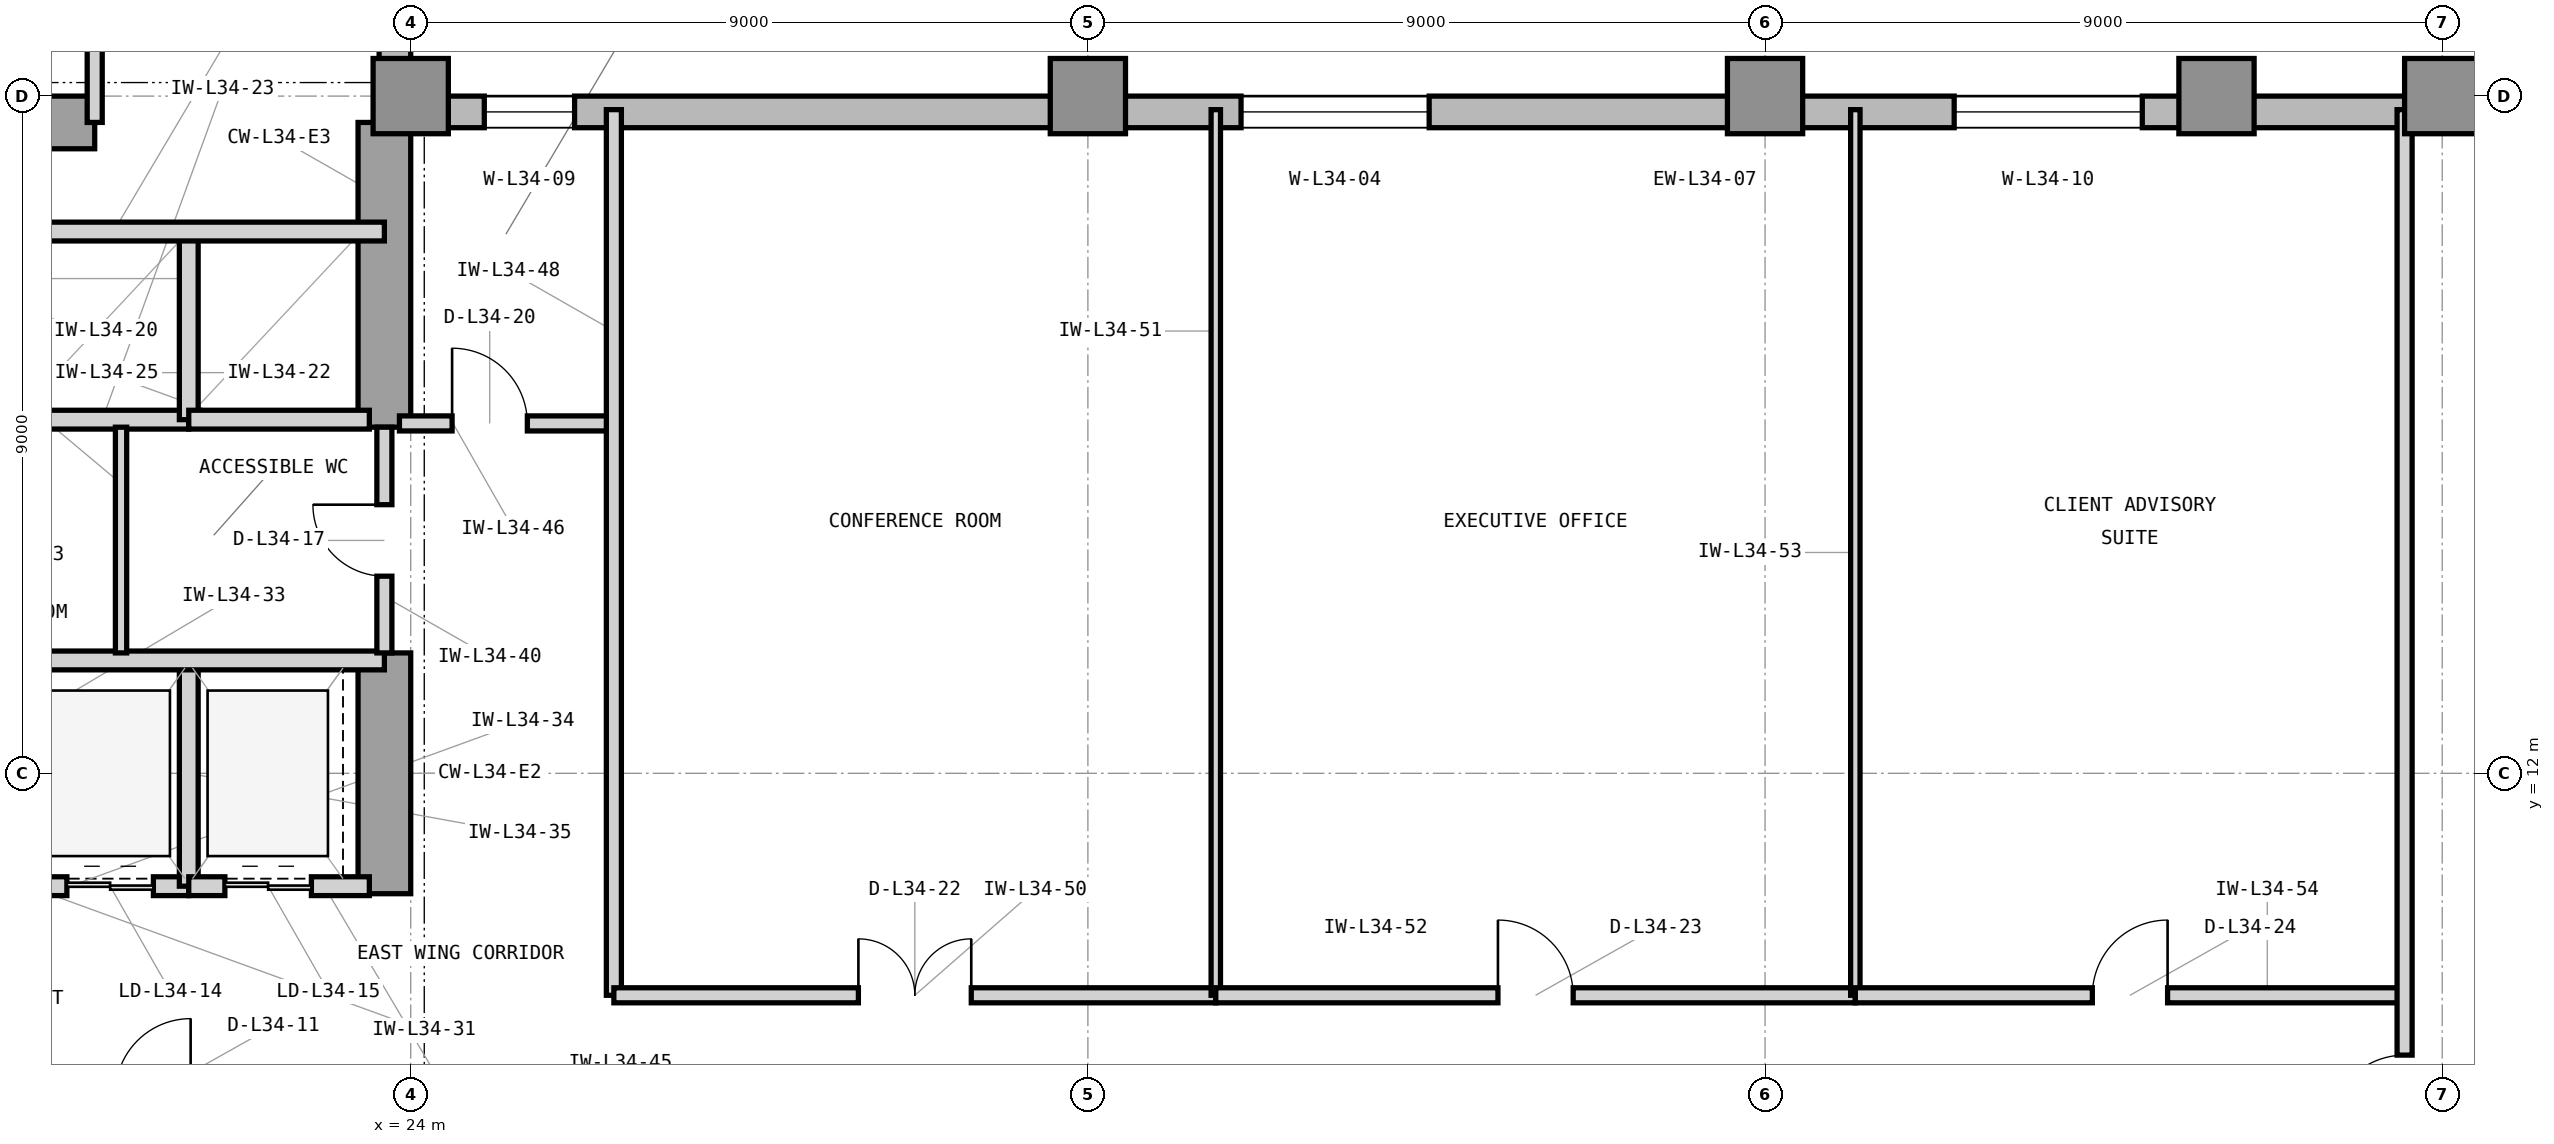
"""IFC4 building model, lengths in metres.
Left out: names, types, materials, properties, quantities, classifications, styles, units other than length and angle.
Written with IfcOpenShell. Run it as: python <this file> out.ifc"""

import sys

from ifc_helpers import new_model, si_unit, direction, frame, frame_2d, origin, origin_2d, place, context, subcontext, project, spatial, rectangle, extrude, element, fill, save


model = new_model("IFC4")
c1 = context("Model", 3, precision=1e-05, world=origin(), true_north=direction((0.0, 1.0)))
c2 = subcontext(c1, "Body", "Model", "MODEL_VIEW")
j1 = project(units=[si_unit("LENGTHUNIT", "METRE"), si_unit("PLANEANGLEUNIT", "RADIAN")], contexts=[c1])
p1 = place(None, origin())
s1 = spatial("IfcSite", under=j1, at=p1, CompositionType="ELEMENT")
p2 = place(p1, origin())
s2 = spatial("IfcBuilding", under=s1, at=p2, CompositionType="ELEMENT")
p3 = place(p2, frame((0.0, 0.0, 144.0)))
s3 = spatial("IfcBuildingStorey", under=s2, at=p3, CompositionType="ELEMENT", Elevation=144.0)
p4 = place(p3, frame((7.475, 20.65, 0.0), z_axis=(0.0, 0.0, 1.0), x_axis=(1.0, 0.0, 0.0)))
e1 = element("IfcWall", 1, at=p4, inside=s3, PredefinedType="SHEAR", context=c2, shape_type="SweptSolid", body=[
    extrude(rectangle(XDim=12.325, YDim=0.7, at=frame_2d((6.163, 0.0))), origin(), (0.0, 0.0, 1.0), 3.9),
])
p5 = place(p3, frame((23.65, 10.4, 0.0), z_axis=(0.0, 0.0, 1.0), x_axis=(0.0, 1.0, 0.0)))
e2 = element("IfcWall", 2, at=p5, inside=s3, PredefinedType="SHEAR", context=c2, shape_type="SweptSolid", body=[
    extrude(rectangle(XDim=3.2, YDim=0.7, at=frame_2d((1.6, 0.0))), origin(), (0.0, 0.0, 1.0), 3.9),
])
p6 = place(p3, frame((23.65, 16.6, 0.0), z_axis=(0.0, 0.0, 1.0), x_axis=(0.0, 1.0, 0.0)))
e3 = element("IfcWall", 3, at=p6, inside=s3, PredefinedType="SHEAR", context=c2, shape_type="SweptSolid", body=[
    extrude(rectangle(XDim=4.05, YDim=0.7, at=frame_2d((2.025, 0.0))), origin(), (0.0, 0.0, 1.0), 3.9),
])
for number, where, z_axis, x_axis in (
    (4, (24.0, 21.0, 0.0), (0.0, 0.0, 1.0), (1.0, 0.0, 0.0)),
    (5, (33.0, 21.0, 0.0), (0.0, 0.0, 1.0), (1.0, 0.0, 0.0)),
    (6, (42.0, 21.0, 0.0), (0.0, 0.0, 1.0), (1.0, 0.0, 0.0)),
    (7, (48.0, 21.0, 0.0), (0.0, 0.0, 1.0), (1.0, 0.0, 0.0)),
    (8, (51.0, 21.0, 0.0), (0.0, 0.0, 1.0), (1.0, 0.0, 0.0)),
):
    element("IfcColumn", number, at=place(p3, frame(where, z_axis=z_axis, x_axis=x_axis)), inside=s3, PredefinedType="COLUMN", context=c2, shape_type="SweptSolid", body=[
        extrude(rectangle(XDim=1.0, YDim=1.0, at=origin_2d()), origin(), (0.0, 0.0, 1.0), 3.9),
    ])
p7 = place(p3, frame((58.4, 20.79, 0.0), z_axis=(0.0, 0.0, 1.0), x_axis=(-1.0, 0.0, 0.0)))
e9 = element("IfcWall", 9, at=p7, inside=s3, PredefinedType="STANDARD", context=c2, shape_type="SweptSolid", body=[
    extrude(rectangle(XDim=34.4, YDim=0.42, at=frame_2d((17.2, 0.0))), origin(), (0.0, 0.0, 1.0), 3.7),
])
p8 = place(p7, frame((20.864, 0.0, 0.85)))
e10 = element("IfcOpeningElement", 10, at=p8, cuts=e9, PredefinedType="OPENING", context=c2, shape_type="SweptSolid", body=[
    extrude(rectangle(XDim=2.5, YDim=2.25, at=frame_2d((1.25, 1.125))), frame((0.0, 0.22, 0.0), z_axis=(0.0, -1.0, 0.0), x_axis=(1.0, 0.0, 0.0)), (0.0, 0.0, 1.0), 0.44),
])
p9 = place(p7, frame((32.222, 0.0, 0.85)))
e11 = element("IfcOpeningElement", 11, at=p9, cuts=e9, PredefinedType="OPENING", context=c2, shape_type="SweptSolid", body=[
    extrude(rectangle(XDim=1.2, YDim=2.25, at=frame_2d((0.6, 1.125))), frame((0.0, 0.22, 0.0), z_axis=(0.0, -1.0, 0.0), x_axis=(1.0, 0.0, 0.0)), (0.0, 0.0, 1.0), 0.44),
])
p10 = place(p7, frame((11.386, 0.0, 0.85)))
e12 = element("IfcOpeningElement", 12, at=p10, cuts=e9, PredefinedType="OPENING", context=c2, shape_type="SweptSolid", body=[
    extrude(rectangle(XDim=2.5, YDim=2.25, at=frame_2d((1.25, 1.125))), frame((0.0, 0.22, 0.0), z_axis=(0.0, -1.0, 0.0), x_axis=(1.0, 0.0, 0.0)), (0.0, 0.0, 1.0), 0.44),
])
p11 = place(p3, frame((23.79, 21.0, 0.0), z_axis=(0.0, 0.0, 1.0), x_axis=(0.0, 1.0, 0.0)))
e13 = element("IfcWall", 13, at=p11, inside=s3, PredefinedType="STANDARD", context=c2, shape_type="SweptSolid", body=[
    extrude(rectangle(XDim=25.4, YDim=0.42, at=frame_2d((12.7, 0.0))), origin(), (0.0, 0.0, 1.0), 3.7),
])
p12 = place(p11, frame((11.45, 0.0, 0.85)))
e14 = element("IfcOpeningElement", 14, at=p12, cuts=e13, PredefinedType="OPENING", context=c2, shape_type="SweptSolid", body=[
    extrude(rectangle(XDim=2.5, YDim=2.25, at=frame_2d((1.25, 1.125))), frame((0.0, 0.22, 0.0), z_axis=(0.0, -1.0, 0.0), x_axis=(1.0, 0.0, 0.0)), (0.0, 0.0, 1.0), 0.44),
])
p13 = place(p11, frame((15.966, 0.0, 0.85)))
e15 = element("IfcOpeningElement", 15, at=p13, cuts=e13, PredefinedType="OPENING", context=c2, shape_type="SweptSolid", body=[
    extrude(rectangle(XDim=1.2, YDim=2.25, at=frame_2d((0.6, 1.125))), frame((0.0, 0.22, 0.0), z_axis=(0.0, -1.0, 0.0), x_axis=(1.0, 0.0, 0.0)), (0.0, 0.0, 1.0), 0.44),
])
p14 = place(p3, frame((18.75, 16.7, 0.0), z_axis=(0.0, 0.0, 1.0), x_axis=(1.0, 0.0, 0.0)))
e16 = element("IfcWall", 16, at=p14, inside=s3, PredefinedType="PARTITIONING", context=c2, shape_type="SweptSolid", body=[
    extrude(rectangle(XDim=2.3, YDim=0.25, at=frame_2d((1.15, 0.0))), origin(), (0.0, 0.0, 1.0), 3.233),
])
p15 = place(p3, frame((21.05, 16.7, 0.0), z_axis=(0.0, 0.0, 1.0), x_axis=(0.0, 1.0, 0.0)))
e17 = element("IfcWall", 17, at=p15, inside=s3, PredefinedType="PARTITIONING", context=c2, shape_type="SweptSolid", body=[
    extrude(rectangle(XDim=2.5, YDim=0.25, at=frame_2d((1.25, 0.0))), origin(), (0.0, 0.0, 1.0), 3.69),
])
p16 = place(p3, frame((21.05, 16.7, 0.0), z_axis=(0.0, 0.0, 1.0), x_axis=(1.0, 0.0, 0.0)))
e18 = element("IfcWall", 18, at=p16, inside=s3, PredefinedType="PARTITIONING", context=c2, shape_type="SweptSolid", body=[
    extrude(rectangle(XDim=2.4, YDim=0.25, at=frame_2d((1.2, 0.0))), origin(), (0.0, 0.0, 1.0), 3.233),
])
p17 = place(p3, frame((16.45, 19.2, 0.0), z_axis=(0.0, 0.0, 1.0), x_axis=(1.0, 0.0, 0.0)))
e19 = element("IfcWall", 19, at=p17, inside=s3, PredefinedType="PARTITIONING", context=c2, shape_type="SweptSolid", body=[
    extrude(rectangle(XDim=7.2, YDim=0.25, at=frame_2d((3.6, 0.0))), origin(), (0.0, 0.0, 1.0), 3.69),
])
p18 = place(p3, frame((18.95, 10.5, 0.0), z_axis=(0.0, 0.0, 1.0), x_axis=(1.0, 0.0, 0.0)))
e20 = element("IfcWall", 20, at=p18, inside=s3, PredefinedType="PARTITIONING", context=c2, shape_type="SweptSolid", body=[
    extrude(rectangle(XDim=2.1, YDim=0.25, at=frame_2d((1.05, 0.0))), origin(), (0.0, 0.0, 1.0), 3.233),
])
p19 = place(p18, frame((0.48, 0.0, 0.0)))
e21 = element("IfcOpeningElement", 21, at=p19, cuts=e20, PredefinedType="OPENING", context=c2, shape_type="SweptSolid", body=[
    extrude(rectangle(XDim=1.15, YDim=2.25, at=frame_2d((0.575, 1.125))), frame((0.0, 0.135, 0.0), z_axis=(0.0, -1.0, 0.0), x_axis=(1.0, 0.0, 0.0)), (0.0, 0.0, 1.0), 0.27),
])
p20 = place(p3, frame((21.05, 10.5, 0.0), z_axis=(0.0, 0.0, 1.0), x_axis=(0.0, 1.0, 0.0)))
e22 = element("IfcWall", 22, at=p20, inside=s3, PredefinedType="PARTITIONING", context=c2, shape_type="SweptSolid", body=[
    extrude(rectangle(XDim=3.0, YDim=0.25, at=frame_2d((1.5, 0.0))), origin(), (0.0, 0.0, 1.0), 3.69),
])
p21 = place(p3, frame((21.05, 10.5, 0.0), z_axis=(0.0, 0.0, 1.0), x_axis=(1.0, 0.0, 0.0)))
e23 = element("IfcWall", 23, at=p21, inside=s3, PredefinedType="PARTITIONING", context=c2, shape_type="SweptSolid", body=[
    extrude(rectangle(XDim=2.4, YDim=0.25, at=frame_2d((1.2, 0.0))), origin(), (0.0, 0.0, 1.0), 3.233),
])
p22 = place(p21, frame((0.48, 0.0, 0.0)))
e24 = element("IfcOpeningElement", 24, at=p22, cuts=e23, PredefinedType="OPENING", context=c2, shape_type="SweptSolid", body=[
    extrude(rectangle(XDim=1.15, YDim=2.25, at=frame_2d((0.575, 1.125))), frame((0.0, 0.135, 0.0), z_axis=(0.0, -1.0, 0.0), x_axis=(1.0, 0.0, 0.0)), (0.0, 0.0, 1.0), 0.27),
])
p23 = place(p3, frame((14.7, 13.5, 0.0), z_axis=(0.0, 0.0, 1.0), x_axis=(1.0, 0.0, 0.0)))
e25 = element("IfcWall", 25, at=p23, inside=s3, PredefinedType="PARTITIONING", context=c2, shape_type="SweptSolid", body=[
    extrude(rectangle(XDim=8.95, YDim=0.25, at=frame_2d((4.475, 0.0))), origin(), (0.0, 0.0, 1.0), 3.233),
])
p24 = place(p3, frame((20.15, 13.6, 0.0), z_axis=(0.0, 0.0, 1.0), x_axis=(0.0, 1.0, 0.0)))
e26 = element("IfcWall", 26, at=p24, inside=s3, PredefinedType="PARTITIONING", context=c2, shape_type="SweptSolid", body=[
    extrude(rectangle(XDim=3.0, YDim=0.15, at=frame_2d((1.5, 0.0))), origin(), (0.0, 0.0, 1.0), 3.69),
])
p25 = place(p3, frame((23.65, 13.6, 0.0), z_axis=(0.0, 0.0, 1.0), x_axis=(0.0, 1.0, 0.0)))
e27 = element("IfcWall", 27, at=p25, inside=s3, PredefinedType="PARTITIONING", context=c2, shape_type="SweptSolid", body=[
    extrude(rectangle(XDim=3.0, YDim=0.2, at=frame_2d((1.5, 0.0))), origin(), (0.0, 0.0, 1.0), 3.69),
])
p26 = place(p25, frame((1.02, 0.0, 0.0)))
e28 = element("IfcOpeningElement", 28, at=p26, cuts=e27, PredefinedType="OPENING", context=c2, shape_type="SweptSolid", body=[
    extrude(rectangle(XDim=0.95, YDim=2.1, at=frame_2d((0.475, 1.05))), frame((0.0, 0.11, 0.0), z_axis=(0.0, -1.0, 0.0), x_axis=(1.0, 0.0, 0.0)), (0.0, 0.0, 1.0), 0.22),
])
p27 = place(p3, frame((23.85, 16.65, 0.0), z_axis=(0.0, 0.0, 1.0), x_axis=(1.0, 0.0, 0.0)))
e29 = element("IfcWall", 29, at=p27, inside=s3, PredefinedType="PARTITIONING", context=c2, shape_type="SweptSolid", body=[
    extrude(rectangle(XDim=2.85, YDim=0.2, at=frame_2d((1.425, 0.0))), origin(), (0.0, 0.0, 1.0), 3.69),
])
p28 = place(p27, frame((0.7, 0.0, 0.0)))
e30 = element("IfcOpeningElement", 30, at=p28, cuts=e29, PredefinedType="OPENING", context=c2, shape_type="SweptSolid", body=[
    extrude(rectangle(XDim=1.0, YDim=2.15, at=frame_2d((0.5, 1.075))), frame((0.0, 0.11, 0.0), z_axis=(0.0, -1.0, 0.0), x_axis=(1.0, 0.0, 0.0)), (0.0, 0.0, 1.0), 0.22),
])
p29 = place(p3, frame((26.7, 9.05, 0.0), z_axis=(0.0, 0.0, 1.0), x_axis=(0.0, 1.0, 0.0)))
e31 = element("IfcWall", 31, at=p29, inside=s3, PredefinedType="PARTITIONING", context=c2, shape_type="SweptSolid", body=[
    extrude(rectangle(XDim=11.77, YDim=0.2, at=frame_2d((5.885, 0.0))), origin(), (0.0, 0.0, 1.0), 3.69),
])
p30 = place(p3, frame((26.7, 9.05, 0.0), z_axis=(0.0, 0.0, 1.0), x_axis=(1.0, 0.0, 0.0)))
e32 = element("IfcWall", 32, at=p30, inside=s3, PredefinedType="PARTITIONING", context=c2, shape_type="SweptSolid", body=[
    extrude(rectangle(XDim=8.0, YDim=0.2, at=frame_2d((4.0, 0.0))), origin(), (0.0, 0.0, 1.0), 3.233),
])
p31 = place(p30, frame((3.25, 0.0, 0.0)))
e33 = element("IfcOpeningElement", 33, at=p31, cuts=e32, PredefinedType="OPENING", context=c2, shape_type="SweptSolid", body=[
    extrude(rectangle(XDim=1.5, YDim=2.3, at=frame_2d((0.75, 1.15))), frame((0.0, 0.11, 0.0), z_axis=(0.0, -1.0, 0.0), x_axis=(1.0, 0.0, 0.0)), (0.0, 0.0, 1.0), 0.22),
])
p32 = place(p3, frame((34.7, 9.05, 0.0), z_axis=(0.0, 0.0, 1.0), x_axis=(0.0, 1.0, 0.0)))
e34 = element("IfcWall", 34, at=p32, inside=s3, PredefinedType="PARTITIONING", context=c2, shape_type="SweptSolid", body=[
    extrude(rectangle(XDim=11.77, YDim=0.125, at=frame_2d((5.885, 0.0))), origin(), (0.0, 0.0, 1.0), 3.69),
])
p33 = place(p3, frame((34.7, 9.05, 0.0), z_axis=(0.0, 0.0, 1.0), x_axis=(1.0, 0.0, 0.0)))
e35 = element("IfcWall", 35, at=p33, inside=s3, PredefinedType="PARTITIONING", context=c2, shape_type="SweptSolid", body=[
    extrude(rectangle(XDim=8.5, YDim=0.2, at=frame_2d((4.25, 0.0))), origin(), (0.0, 0.0, 1.0), 3.233),
])
p34 = place(p33, frame((3.75, 0.0, 0.0)))
e36 = element("IfcOpeningElement", 36, at=p34, cuts=e35, PredefinedType="OPENING", context=c2, shape_type="SweptSolid", body=[
    extrude(rectangle(XDim=1.0, YDim=2.15, at=frame_2d((0.5, 1.075))), frame((0.0, 0.11, 0.0), z_axis=(0.0, -1.0, 0.0), x_axis=(1.0, 0.0, 0.0)), (0.0, 0.0, 1.0), 0.22),
])
p35 = place(p3, frame((43.2, 9.05, 0.0), z_axis=(0.0, 0.0, 1.0), x_axis=(0.0, 1.0, 0.0)))
e37 = element("IfcWall", 37, at=p35, inside=s3, PredefinedType="PARTITIONING", context=c2, shape_type="SweptSolid", body=[
    extrude(rectangle(XDim=11.77, YDim=0.125, at=frame_2d((5.885, 0.0))), origin(), (0.0, 0.0, 1.0), 3.69),
])
p36 = place(p3, frame((43.2, 9.05, 0.0), z_axis=(0.0, 0.0, 1.0), x_axis=(1.0, 0.0, 0.0)))
e38 = element("IfcWall", 38, at=p36, inside=s3, PredefinedType="PARTITIONING", context=c2, shape_type="SweptSolid", body=[
    extrude(rectangle(XDim=7.3, YDim=0.2, at=frame_2d((3.65, 0.0))), origin(), (0.0, 0.0, 1.0), 3.233),
])
p37 = place(p36, frame((3.15, 0.0, 0.0)))
e39 = element("IfcOpeningElement", 39, at=p37, cuts=e38, PredefinedType="OPENING", context=c2, shape_type="SweptSolid", body=[
    extrude(rectangle(XDim=1.0, YDim=2.15, at=frame_2d((0.5, 1.075))), frame((0.0, 0.11, 0.0), z_axis=(0.0, -1.0, 0.0), x_axis=(1.0, 0.0, 0.0)), (0.0, 0.0, 1.0), 0.22),
])
p38 = place(p3, frame((50.5, 3.18, 0.0), z_axis=(0.0, 0.0, 1.0), x_axis=(0.0, 1.0, 0.0)))
e40 = element("IfcWall", 40, at=p38, inside=s3, PredefinedType="PARTITIONING", context=c2, shape_type="SweptSolid", body=[
    extrude(rectangle(XDim=17.64, YDim=0.2, at=frame_2d((8.82, 0.0))), origin(), (0.0, 0.0, 1.0), 3.69),
])
p39 = place(p38, frame((4.075, 0.0, 0.0)))
e41 = element("IfcOpeningElement", 41, at=p39, cuts=e40, PredefinedType="OPENING", context=c2, shape_type="SweptSolid", body=[
    extrude(rectangle(XDim=1.0, YDim=2.15, at=frame_2d((0.5, 1.075))), frame((0.0, 0.11, 0.0), z_axis=(0.0, -1.0, 0.0), x_axis=(1.0, 0.0, 0.0)), (0.0, 0.0, 1.0), 0.22),
])
p40 = place(p3, frame((19.8, 20.65, 0.0), z_axis=(0.0, 0.0, 1.0), x_axis=(0.0, 1.0, 0.0)))
e42 = element("IfcWall", 42, at=p40, inside=s3, PredefinedType="PARTITIONING", context=c2, shape_type="SweptSolid", body=[
    extrude(rectangle(XDim=6.15, YDim=0.2, at=frame_2d((3.075, 0.0))), origin(), (0.0, 0.0, 1.0), 3.69),
])
p41 = place(p8, origin())
e43 = element("IfcWindow", 43, at=p41, inside=s3, PartitioningType="SINGLE_PANEL", PredefinedType="WINDOW", context=c2, shape_type="SweptSolid", body=[
    extrude(rectangle(XDim=2.5, YDim=2.25, at=frame_2d((1.25, 1.125))), frame((0.0, 0.11, 0.0), z_axis=(0.0, -1.0, 0.0), x_axis=(1.0, 0.0, 0.0)), (0.0, 0.0, 1.0), 0.06),
])
fill(e10, e43)
p42 = place(p19, origin())
e44 = element("IfcDoor", 44, at=p42, inside=s3, OperationType="DOUBLE_DOOR_SLIDING", PredefinedType="DOOR", context=c2, shape_type="SweptSolid", body=[
    extrude(rectangle(XDim=1.15, YDim=2.25, at=frame_2d((0.575, 1.125))), frame((0.0, 0.025, 0.0), z_axis=(0.0, -1.0, 0.0), x_axis=(1.0, 0.0, 0.0)), (0.0, 0.0, 1.0), 0.05),
])
fill(e21, e44)
p43 = place(p22, origin())
e45 = element("IfcDoor", 45, at=p43, inside=s3, OperationType="DOUBLE_DOOR_SLIDING", PredefinedType="DOOR", context=c2, shape_type="SweptSolid", body=[
    extrude(rectangle(XDim=1.15, YDim=2.25, at=frame_2d((0.575, 1.125))), frame((0.0, 0.025, 0.0), z_axis=(0.0, -1.0, 0.0), x_axis=(1.0, 0.0, 0.0)), (0.0, 0.0, 1.0), 0.05),
])
fill(e24, e45)
p44 = place(p26, origin())
e46 = element("IfcDoor", 46, at=p44, inside=s3, OperationType="SINGLE_SWING_RIGHT", PredefinedType="DOOR", context=c2, shape_type="SweptSolid", body=[
    extrude(rectangle(XDim=0.95, YDim=2.1, at=frame_2d((0.475, 1.05))), frame((0.0, 0.025, 0.0), z_axis=(0.0, -1.0, 0.0), x_axis=(1.0, 0.0, 0.0)), (0.0, 0.0, 1.0), 0.05),
])
fill(e28, e46)
p45 = place(p28, origin())
e47 = element("IfcDoor", 47, at=p45, inside=s3, OperationType="SINGLE_SWING_LEFT", PredefinedType="DOOR", context=c2, shape_type="SweptSolid", body=[
    extrude(rectangle(XDim=1.0, YDim=2.15, at=frame_2d((0.5, 1.075))), frame((0.0, 0.025, 0.0), z_axis=(0.0, -1.0, 0.0), x_axis=(1.0, 0.0, 0.0)), (0.0, 0.0, 1.0), 0.05),
])
fill(e30, e47)
p46 = place(p31, origin())
e48 = element("IfcDoor", 48, at=p46, inside=s3, OperationType="DOUBLE_DOOR_SINGLE_SWING", PredefinedType="DOOR", context=c2, shape_type="SweptSolid", body=[
    extrude(rectangle(XDim=1.5, YDim=2.3, at=frame_2d((0.75, 1.15))), frame((0.0, 0.025, 0.0), z_axis=(0.0, -1.0, 0.0), x_axis=(1.0, 0.0, 0.0)), (0.0, 0.0, 1.0), 0.05),
])
fill(e33, e48)
p47 = place(p34, origin())
e49 = element("IfcDoor", 49, at=p47, inside=s3, OperationType="SINGLE_SWING_LEFT", PredefinedType="DOOR", context=c2, shape_type="SweptSolid", body=[
    extrude(rectangle(XDim=1.0, YDim=2.15, at=frame_2d((0.5, 1.075))), frame((0.0, 0.025, 0.0), z_axis=(0.0, -1.0, 0.0), x_axis=(1.0, 0.0, 0.0)), (0.0, 0.0, 1.0), 0.05),
])
fill(e36, e49)
p48 = place(p37, origin())
e50 = element("IfcDoor", 50, at=p48, inside=s3, OperationType="SINGLE_SWING_RIGHT", PredefinedType="DOOR", context=c2, shape_type="SweptSolid", body=[
    extrude(rectangle(XDim=1.0, YDim=2.15, at=frame_2d((0.5, 1.075))), frame((0.0, 0.025, 0.0), z_axis=(0.0, -1.0, 0.0), x_axis=(1.0, 0.0, 0.0)), (0.0, 0.0, 1.0), 0.05),
])
fill(e39, e50)
p49 = place(p39, origin())
e51 = element("IfcDoor", 51, at=p49, inside=s3, OperationType="SINGLE_SWING_LEFT", PredefinedType="DOOR", context=c2, shape_type="SweptSolid", body=[
    extrude(rectangle(XDim=1.0, YDim=2.15, at=frame_2d((0.5, 1.075))), frame((0.0, 0.025, 0.0), z_axis=(0.0, -1.0, 0.0), x_axis=(1.0, 0.0, 0.0)), (0.0, 0.0, 1.0), 0.05),
])
fill(e41, e51)
p50 = place(p9, origin())
e52 = element("IfcWindow", 52, at=p50, inside=s3, PartitioningType="SINGLE_PANEL", PredefinedType="WINDOW", context=c2, shape_type="SweptSolid", body=[
    extrude(rectangle(XDim=1.2, YDim=2.25, at=frame_2d((0.6, 1.125))), frame((0.0, 0.11, 0.0), z_axis=(0.0, -1.0, 0.0), x_axis=(1.0, 0.0, 0.0)), (0.0, 0.0, 1.0), 0.06),
])
fill(e11, e52)
p51 = place(p10, origin())
e53 = element("IfcWindow", 53, at=p51, inside=s3, PartitioningType="SINGLE_PANEL", PredefinedType="WINDOW", context=c2, shape_type="SweptSolid", body=[
    extrude(rectangle(XDim=2.5, YDim=2.25, at=frame_2d((1.25, 1.125))), frame((0.0, 0.11, 0.0), z_axis=(0.0, -1.0, 0.0), x_axis=(1.0, 0.0, 0.0)), (0.0, 0.0, 1.0), 0.06),
])
fill(e12, e53)
save(model, sys.argv[1])
